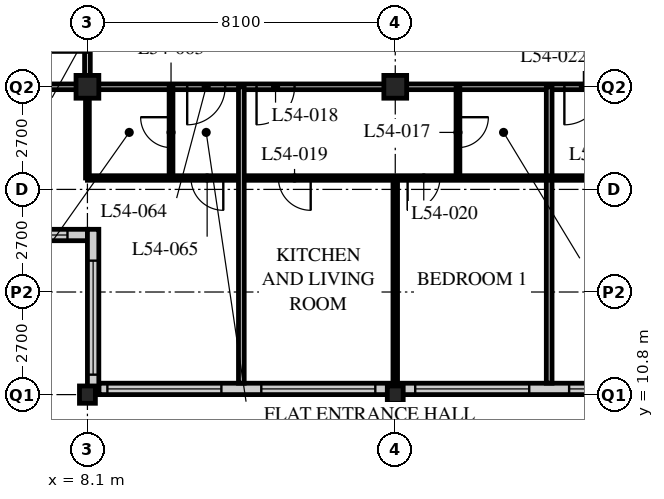
"""IFC4 building model, lengths in metres.
Left out: names, types, materials, properties, quantities, classifications, styles, units other than length and angle.
Written with IfcOpenShell. Run it as: python <this file> out.ifc"""

import sys

from ifc_helpers import new_model, si_unit, direction, frame, frame_2d, origin, origin_2d, place, context, subcontext, project, spatial, rectangle, hollow_rectangle, i_section, extrude, element, fill, save


model = new_model("IFC4")
c1 = context("Model", 3, precision=1e-05, world=origin(), true_north=direction((0.0, 1.0)))
c2 = subcontext(c1, "Body", "Model", "MODEL_VIEW")
j1 = project(units=[si_unit("LENGTHUNIT", "METRE"), si_unit("PLANEANGLEUNIT", "RADIAN")], contexts=[c1])
p1 = place(None, origin())
s1 = spatial("IfcSite", under=j1, at=p1, CompositionType="ELEMENT")
p2 = place(p1, origin())
s2 = spatial("IfcBuilding", under=s1, at=p2, CompositionType="ELEMENT")
p3 = place(p2, frame((0.0, 0.0, 210.0)))
s3 = spatial("IfcBuildingStorey", under=s2, at=p3, CompositionType="ELEMENT", Elevation=210.0)
p4 = place(p3, frame((8.1, 10.8, 0.0), z_axis=(0.0, 0.0, 1.0), x_axis=(1.0, 0.0, 0.0)))
e1 = element("IfcColumn", 1, at=p4, inside=s3, PredefinedType="COLUMN", context=c2, shape_type="SweptSolid", body=[
    extrude(i_section(OverallWidth=0.418, OverallDepth=0.456, WebThickness=0.042, FlangeThickness=0.067, FilletRadius=0.015, at=origin_2d()), origin(), (0.0, 0.0, 1.0), 3.6),
])
p5 = place(p3, frame((8.1, 18.9, 0.0), z_axis=(0.0, 0.0, 1.0), x_axis=(1.0, 0.0, 0.0)))
e2 = element("IfcColumn", 2, at=p5, inside=s3, PredefinedType="COLUMN", context=c2, shape_type="SweptSolid", body=[
    extrude(hollow_rectangle(XDim=0.6, YDim=0.6, WallThickness=0.05, at=origin_2d()), origin(), (0.0, 0.0, 1.0), 3.6),
])
p6 = place(p3, frame((16.2, 10.8, 0.0), z_axis=(0.0, 0.0, 1.0), x_axis=(1.0, 0.0, 0.0)))
e3 = element("IfcColumn", 3, at=p6, inside=s3, PredefinedType="COLUMN", context=c2, shape_type="SweptSolid", body=[
    extrude(i_section(OverallWidth=0.418, OverallDepth=0.456, WebThickness=0.042, FlangeThickness=0.067, FilletRadius=0.015, at=origin_2d()), origin(), (0.0, 0.0, 1.0), 3.6),
])
p7 = place(p3, frame((16.2, 18.9, 0.0), z_axis=(0.0, 0.0, 1.0), x_axis=(1.0, 0.0, 0.0)))
e4 = element("IfcColumn", 4, at=p7, inside=s3, PredefinedType="COLUMN", context=c2, shape_type="SweptSolid", body=[
    extrude(hollow_rectangle(XDim=0.6, YDim=0.6, WallThickness=0.05, at=origin_2d()), origin(), (0.0, 0.0, 1.0), 3.6),
])
p8 = place(p3, frame((8.4, 10.95, 0.0), z_axis=(0.0, 0.0, 1.0), x_axis=(1.0, 0.0, 0.0)))
e5 = element("IfcWall", 5, at=p8, inside=s3, PredefinedType="SOLIDWALL", context=c2, shape_type="SweptSolid", body=[
    extrude(rectangle(XDim=40.2, YDim=0.3, at=frame_2d((20.1, 0.0))), origin(), (0.0, 0.0, 1.0), 3.39),
])
p9 = place(p8, frame((0.225, 0.0, 0.6)))
e6 = element("IfcOpeningElement", 6, at=p9, cuts=e5, PredefinedType="OPENING", context=c2, shape_type="SweptSolid", body=[
    extrude(rectangle(XDim=3.0, YDim=2.4, at=frame_2d((1.5, 1.2))), frame((0.0, 0.16, 0.0), z_axis=(0.0, -1.0, 0.0), x_axis=(1.0, 0.0, 0.0)), (0.0, 0.0, 1.0), 0.32),
])
p10 = place(p8, frame((4.275, 0.0, 0.6)))
e7 = element("IfcOpeningElement", 7, at=p10, cuts=e5, PredefinedType="OPENING", context=c2, shape_type="SweptSolid", body=[
    extrude(rectangle(XDim=3.0, YDim=2.4, at=frame_2d((1.5, 1.2))), frame((0.0, 0.16, 0.0), z_axis=(0.0, -1.0, 0.0), x_axis=(1.0, 0.0, 0.0)), (0.0, 0.0, 1.0), 0.32),
])
p11 = place(p8, frame((8.325, 0.0, 0.6)))
e8 = element("IfcOpeningElement", 8, at=p11, cuts=e5, PredefinedType="OPENING", context=c2, shape_type="SweptSolid", body=[
    extrude(rectangle(XDim=3.0, YDim=2.4, at=frame_2d((1.5, 1.2))), frame((0.0, 0.16, 0.0), z_axis=(0.0, -1.0, 0.0), x_axis=(1.0, 0.0, 0.0)), (0.0, 0.0, 1.0), 0.32),
])
p12 = place(p8, frame((12.375, 0.0, 0.6)))
e9 = element("IfcOpeningElement", 9, at=p12, cuts=e5, PredefinedType="OPENING", context=c2, shape_type="SweptSolid", body=[
    extrude(rectangle(XDim=3.0, YDim=2.4, at=frame_2d((1.5, 1.2))), frame((0.0, 0.16, 0.0), z_axis=(0.0, -1.0, 0.0), x_axis=(1.0, 0.0, 0.0)), (0.0, 0.0, 1.0), 0.32),
])
p13 = place(p8, frame((16.425, 0.0, 0.6)))
e10 = element("IfcOpeningElement", 10, at=p13, cuts=e5, PredefinedType="OPENING", context=c2, shape_type="SweptSolid", body=[
    extrude(rectangle(XDim=3.0, YDim=2.4, at=frame_2d((1.5, 1.2))), frame((0.0, 0.16, 0.0), z_axis=(0.0, -1.0, 0.0), x_axis=(1.0, 0.0, 0.0)), (0.0, 0.0, 1.0), 0.32),
])
p14 = place(p8, frame((20.475, 0.0, 0.6)))
e11 = element("IfcOpeningElement", 11, at=p14, cuts=e5, PredefinedType="OPENING", context=c2, shape_type="SweptSolid", body=[
    extrude(rectangle(XDim=3.0, YDim=2.4, at=frame_2d((1.5, 1.2))), frame((0.0, 0.16, 0.0), z_axis=(0.0, -1.0, 0.0), x_axis=(1.0, 0.0, 0.0)), (0.0, 0.0, 1.0), 0.32),
])
p15 = place(p8, frame((24.525, 0.0, 0.6)))
e12 = element("IfcOpeningElement", 12, at=p15, cuts=e5, PredefinedType="OPENING", context=c2, shape_type="SweptSolid", body=[
    extrude(rectangle(XDim=3.0, YDim=2.4, at=frame_2d((1.5, 1.2))), frame((0.0, 0.16, 0.0), z_axis=(0.0, -1.0, 0.0), x_axis=(1.0, 0.0, 0.0)), (0.0, 0.0, 1.0), 0.32),
])
p16 = place(p8, frame((28.575, 0.0, 0.6)))
e13 = element("IfcOpeningElement", 13, at=p16, cuts=e5, PredefinedType="OPENING", context=c2, shape_type="SweptSolid", body=[
    extrude(rectangle(XDim=3.0, YDim=2.4, at=frame_2d((1.5, 1.2))), frame((0.0, 0.16, 0.0), z_axis=(0.0, -1.0, 0.0), x_axis=(1.0, 0.0, 0.0)), (0.0, 0.0, 1.0), 0.32),
])
p17 = place(p8, frame((32.625, 0.0, 0.6)))
e14 = element("IfcOpeningElement", 14, at=p17, cuts=e5, PredefinedType="OPENING", context=c2, shape_type="SweptSolid", body=[
    extrude(rectangle(XDim=3.0, YDim=2.4, at=frame_2d((1.5, 1.2))), frame((0.0, 0.16, 0.0), z_axis=(0.0, -1.0, 0.0), x_axis=(1.0, 0.0, 0.0)), (0.0, 0.0, 1.0), 0.32),
])
p18 = place(p8, frame((36.675, 0.0, 0.6)))
e15 = element("IfcOpeningElement", 15, at=p18, cuts=e5, PredefinedType="OPENING", context=c2, shape_type="SweptSolid", body=[
    extrude(rectangle(XDim=3.0, YDim=2.4, at=frame_2d((1.5, 1.2))), frame((0.0, 0.16, 0.0), z_axis=(0.0, -1.0, 0.0), x_axis=(1.0, 0.0, 0.0)), (0.0, 0.0, 1.0), 0.32),
])
p19 = place(p3, frame((4.35, 15.0, 0.0), z_axis=(0.0, 0.0, 1.0), x_axis=(1.0, 0.0, 0.0)))
e16 = element("IfcWall", 16, at=p19, inside=s3, PredefinedType="SOLIDWALL", context=c2, shape_type="SweptSolid", body=[
    extrude(rectangle(XDim=3.75, YDim=0.3, at=frame_2d((1.875, 0.0))), origin(), (0.0, 0.0, 1.0), 3.39),
])
p20 = place(p19, frame((0.225, 0.0, 0.6)))
e17 = element("IfcOpeningElement", 17, at=p20, cuts=e16, PredefinedType="OPENING", context=c2, shape_type="SweptSolid", body=[
    extrude(rectangle(XDim=3.0, YDim=2.0, at=frame_2d((1.5, 1.0))), frame((0.0, 0.16, 0.0), z_axis=(0.0, -1.0, 0.0), x_axis=(1.0, 0.0, 0.0)), (0.0, 0.0, 1.0), 0.32),
])
p21 = place(p3, frame((8.25, 15.15, 0.0), z_axis=(0.0, 0.0, 1.0), x_axis=(0.0, -1.0, 0.0)))
e18 = element("IfcWall", 18, at=p21, inside=s3, PredefinedType="SOLIDWALL", context=c2, shape_type="SweptSolid", body=[
    extrude(rectangle(XDim=4.35, YDim=0.3, at=frame_2d((2.175, 0.0))), origin(), (0.0, 0.0, 1.0), 3.39),
])
p22 = place(p21, frame((0.825, 0.0, 0.6)))
e19 = element("IfcOpeningElement", 19, at=p22, cuts=e18, PredefinedType="OPENING", context=c2, shape_type="SweptSolid", body=[
    extrude(rectangle(XDim=3.0, YDim=2.0, at=frame_2d((1.5, 1.0))), frame((0.0, 0.16, 0.0), z_axis=(0.0, -1.0, 0.0), x_axis=(1.0, 0.0, 0.0)), (0.0, 0.0, 1.0), 0.32),
])
p23 = place(p3, frame((8.1, 18.9, 0.0), z_axis=(0.0, 0.0, 1.0), x_axis=(1.0, 0.0, 0.0)))
e20 = element("IfcWall", 20, at=p23, inside=s3, PredefinedType="PARTITIONING", context=c2, shape_type="SweptSolid", body=[
    extrude(rectangle(XDim=36.45, YDim=0.15, at=frame_2d((18.225, 0.0))), origin(), (0.0, 0.0, 1.0), 2.778),
])
p24 = place(p23, frame((4.45, 0.0, 0.0)))
e21 = element("IfcOpeningElement", 21, at=p24, cuts=e20, PredefinedType="OPENING", context=c2, shape_type="SweptSolid", body=[
    extrude(rectangle(XDim=1.0, YDim=2.1, at=frame_2d((0.5, 1.05))), frame((0.0, 0.085, 0.0), z_axis=(0.0, -1.0, 0.0), x_axis=(1.0, 0.0, 0.0)), (0.0, 0.0, 1.0), 0.17),
])
p25 = place(p23, frame((12.55, 0.0, 0.0)))
e22 = element("IfcOpeningElement", 22, at=p25, cuts=e20, PredefinedType="OPENING", context=c2, shape_type="SweptSolid", body=[
    extrude(rectangle(XDim=1.0, YDim=2.1, at=frame_2d((0.5, 1.05))), frame((0.0, 0.085, 0.0), z_axis=(0.0, -1.0, 0.0), x_axis=(1.0, 0.0, 0.0)), (0.0, 0.0, 1.0), 0.17),
])
p26 = place(p23, frame((29.05, 0.0, 0.0)))
e23 = element("IfcOpeningElement", 23, at=p26, cuts=e20, PredefinedType="OPENING", context=c2, shape_type="SweptSolid", body=[
    extrude(rectangle(XDim=1.0, YDim=2.1, at=frame_2d((0.5, 1.05))), frame((0.0, 0.085, 0.0), z_axis=(0.0, -1.0, 0.0), x_axis=(1.0, 0.0, 0.0)), (0.0, 0.0, 1.0), 0.17),
])
p27 = place(p23, frame((2.625, 0.0, 0.0)))
e24 = element("IfcOpeningElement", 24, at=p27, cuts=e20, PredefinedType="OPENING", context=c2, shape_type="SweptSolid", body=[
    extrude(rectangle(XDim=1.0, YDim=2.1, at=frame_2d((0.5, 1.05))), frame((0.0, 0.085, 0.0), z_axis=(0.0, -1.0, 0.0), x_axis=(1.0, 0.0, 0.0)), (0.0, 0.0, 1.0), 0.17),
])
p28 = place(p23, frame((33.925, 0.0, 0.0)))
e25 = element("IfcOpeningElement", 25, at=p28, cuts=e20, PredefinedType="OPENING", context=c2, shape_type="SweptSolid", body=[
    extrude(rectangle(XDim=1.0, YDim=2.1, at=frame_2d((0.5, 1.05))), frame((0.0, 0.085, 0.0), z_axis=(0.0, -1.0, 0.0), x_axis=(1.0, 0.0, 0.0)), (0.0, 0.0, 1.0), 0.17),
])
p29 = place(p3, frame((8.1, 18.9, 0.0), z_axis=(0.0, 0.0, 1.0), x_axis=(0.0, 1.0, 0.0)))
e26 = element("IfcWall", 26, at=p29, inside=s3, PredefinedType="PARTITIONING", context=c2, shape_type="SweptSolid", body=[
    extrude(rectangle(XDim=28.35, YDim=0.15, at=frame_2d((14.175, 0.0))), origin(), (0.0, 0.0, 1.0), 2.778),
])
p30 = place(p29, frame((0.9, 0.0, 0.0)))
e27 = element("IfcOpeningElement", 27, at=p30, cuts=e26, PredefinedType="OPENING", context=c2, shape_type="SweptSolid", body=[
    extrude(rectangle(XDim=1.0, YDim=2.1, at=frame_2d((0.5, 1.05))), frame((0.0, 0.085, 0.0), z_axis=(0.0, -1.0, 0.0), x_axis=(1.0, 0.0, 0.0)), (0.0, 0.0, 1.0), 0.17),
])
p31 = place(p29, frame((17.1, 0.0, 0.0)))
e28 = element("IfcOpeningElement", 28, at=p31, cuts=e26, PredefinedType="OPENING", context=c2, shape_type="SweptSolid", body=[
    extrude(rectangle(XDim=1.0, YDim=2.1, at=frame_2d((0.5, 1.05))), frame((0.0, 0.085, 0.0), z_axis=(0.0, -1.0, 0.0), x_axis=(1.0, 0.0, 0.0)), (0.0, 0.0, 1.0), 0.17),
])
p32 = place(p29, frame((26.65, 0.0, 0.0)))
e29 = element("IfcOpeningElement", 29, at=p32, cuts=e26, PredefinedType="OPENING", context=c2, shape_type="SweptSolid", body=[
    extrude(rectangle(XDim=1.0, YDim=2.1, at=frame_2d((0.5, 1.05))), frame((0.0, 0.085, 0.0), z_axis=(0.0, -1.0, 0.0), x_axis=(1.0, 0.0, 0.0)), (0.0, 0.0, 1.0), 0.17),
])
p33 = place(p3, frame((17.85, 18.9, 0.0), z_axis=(0.0, 0.0, 1.0), x_axis=(0.0, -1.0, 0.0)))
e30 = element("IfcWall", 30, at=p33, inside=s3, PredefinedType="PARTITIONING", context=c2, shape_type="SweptSolid", body=[
    extrude(rectangle(XDim=2.4, YDim=0.1, at=frame_2d((1.2, 0.0))), origin(), (0.0, 0.0, 1.0), 3.39),
])
p34 = place(p33, frame((0.8, 0.0, 0.0)))
e31 = element("IfcOpeningElement", 31, at=p34, cuts=e30, PredefinedType="OPENING", context=c2, shape_type="SweptSolid", body=[
    extrude(rectangle(XDim=0.8, YDim=2.1, at=frame_2d((0.4, 1.05))), frame((0.0, 0.06, 0.0), z_axis=(0.0, -1.0, 0.0), x_axis=(1.0, 0.0, 0.0)), (0.0, 0.0, 1.0), 0.12),
])
p35 = place(p3, frame((16.2, 16.5, 0.0), z_axis=(0.0, 0.0, 1.0), x_axis=(0.0, -1.0, 0.0)))
e32 = element("IfcWall", 32, at=p35, inside=s3, PredefinedType="PARTITIONING", context=c2, shape_type="SweptSolid", body=[
    extrude(rectangle(XDim=5.4, YDim=0.12, at=frame_2d((2.7, 0.0))), origin(), (0.0, 0.0, 1.0), 2.778),
])
p36 = place(p3, frame((20.25, 18.9, 0.0), z_axis=(0.0, 0.0, 1.0), x_axis=(0.0, -1.0, 0.0)))
e33 = element("IfcWall", 33, at=p36, inside=s3, PredefinedType="PARTITIONING", context=c2, shape_type="SweptSolid", body=[
    extrude(rectangle(XDim=7.8, YDim=0.15, at=frame_2d((3.9, 0.0))), origin(), (0.0, 0.0, 1.0), 3.39),
])
p37 = place(p3, frame((8.1, 16.5, 0.0), z_axis=(0.0, 0.0, 1.0), x_axis=(1.0, 0.0, 0.0)))
e34 = element("IfcWall", 34, at=p37, inside=s3, PredefinedType="PARTITIONING", context=c2, shape_type="SweptSolid", body=[
    extrude(rectangle(XDim=28.35, YDim=0.12, at=frame_2d((14.175, 0.0))), origin(), (0.0, 0.0, 1.0), 3.39),
])
p38 = place(p37, frame((5.025, 0.0, 0.0)))
e35 = element("IfcOpeningElement", 35, at=p38, cuts=e34, PredefinedType="OPENING", context=c2, shape_type="SweptSolid", body=[
    extrude(rectangle(XDim=0.85, YDim=2.1, at=frame_2d((0.425, 1.05))), frame((0.0, 0.07, 0.0), z_axis=(0.0, -1.0, 0.0), x_axis=(1.0, 0.0, 0.0)), (0.0, 0.0, 1.0), 0.14),
])
p39 = place(p37, frame((8.425, 0.0, 0.0)))
e36 = element("IfcOpeningElement", 36, at=p39, cuts=e34, PredefinedType="OPENING", context=c2, shape_type="SweptSolid", body=[
    extrude(rectangle(XDim=0.85, YDim=2.1, at=frame_2d((0.425, 1.05))), frame((0.0, 0.07, 0.0), z_axis=(0.0, -1.0, 0.0), x_axis=(1.0, 0.0, 0.0)), (0.0, 0.0, 1.0), 0.14),
])
p40 = place(p37, frame((13.125, 0.0, 0.0)))
e37 = element("IfcOpeningElement", 37, at=p40, cuts=e34, PredefinedType="OPENING", context=c2, shape_type="SweptSolid", body=[
    extrude(rectangle(XDim=0.85, YDim=2.1, at=frame_2d((0.425, 1.05))), frame((0.0, 0.07, 0.0), z_axis=(0.0, -1.0, 0.0), x_axis=(1.0, 0.0, 0.0)), (0.0, 0.0, 1.0), 0.14),
])
p41 = place(p37, frame((20.575, 0.0, 0.0)))
e38 = element("IfcOpeningElement", 38, at=p41, cuts=e34, PredefinedType="OPENING", context=c2, shape_type="SweptSolid", body=[
    extrude(rectangle(XDim=0.85, YDim=2.1, at=frame_2d((0.425, 1.05))), frame((0.0, 0.07, 0.0), z_axis=(0.0, -1.0, 0.0), x_axis=(1.0, 0.0, 0.0)), (0.0, 0.0, 1.0), 0.14),
])
p42 = place(p37, frame((24.625, 0.0, 0.0)))
e39 = element("IfcOpeningElement", 39, at=p42, cuts=e34, PredefinedType="OPENING", context=c2, shape_type="SweptSolid", body=[
    extrude(rectangle(XDim=0.85, YDim=2.1, at=frame_2d((0.425, 1.05))), frame((0.0, 0.07, 0.0), z_axis=(0.0, -1.0, 0.0), x_axis=(1.0, 0.0, 0.0)), (0.0, 0.0, 1.0), 0.14),
])
p43 = place(p37, frame((2.725, 0.0, 0.0)))
e40 = element("IfcOpeningElement", 40, at=p43, cuts=e34, PredefinedType="OPENING", context=c2, shape_type="SweptSolid", body=[
    extrude(rectangle(XDim=0.85, YDim=2.1, at=frame_2d((0.425, 1.05))), frame((0.0, 0.07, 0.0), z_axis=(0.0, -1.0, 0.0), x_axis=(1.0, 0.0, 0.0)), (0.0, 0.0, 1.0), 0.14),
])
p44 = place(p3, frame((10.3, 18.9, 0.0), z_axis=(0.0, 0.0, 1.0), x_axis=(0.0, -1.0, 0.0)))
e41 = element("IfcWall", 41, at=p44, inside=s3, PredefinedType="PARTITIONING", context=c2, shape_type="SweptSolid", body=[
    extrude(rectangle(XDim=2.4, YDim=0.1, at=frame_2d((1.2, 0.0))), origin(), (0.0, 0.0, 1.0), 3.39),
])
p45 = place(p44, frame((0.8, 0.0, 0.0)))
e42 = element("IfcOpeningElement", 42, at=p45, cuts=e41, PredefinedType="OPENING", context=c2, shape_type="SweptSolid", body=[
    extrude(rectangle(XDim=0.8, YDim=2.1, at=frame_2d((0.4, 1.05))), frame((0.0, 0.06, 0.0), z_axis=(0.0, -1.0, 0.0), x_axis=(1.0, 0.0, 0.0)), (0.0, 0.0, 1.0), 0.12),
])
p46 = place(p3, frame((8.1, 18.9, 0.0), z_axis=(0.0, 0.0, 1.0), x_axis=(0.0, -1.0, 0.0)))
e43 = element("IfcWall", 43, at=p46, inside=s3, PredefinedType="PARTITIONING", context=c2, shape_type="SweptSolid", body=[
    extrude(rectangle(XDim=2.4, YDim=0.1, at=frame_2d((1.2, 0.0))), origin(), (0.0, 0.0, 1.0), 2.778),
])
p47 = place(p3, frame((4.35, 18.9, 0.0), z_axis=(0.0, 0.0, 1.0), x_axis=(1.0, 0.0, 0.0)))
e44 = element("IfcWall", 44, at=p47, inside=s3, PredefinedType="PARTITIONING", context=c2, shape_type="SweptSolid", body=[
    extrude(rectangle(XDim=3.75, YDim=0.15, at=frame_2d((1.875, 0.0))), origin(), (0.0, 0.0, 1.0), 2.778),
])
p48 = place(p3, frame((12.15, 18.9, 0.0), z_axis=(0.0, 0.0, 1.0), x_axis=(0.0, -1.0, 0.0)))
e45 = element("IfcWall", 45, at=p48, inside=s3, PredefinedType="PARTITIONING", context=c2, shape_type="SweptSolid", body=[
    extrude(rectangle(XDim=7.8, YDim=0.15, at=frame_2d((3.9, 0.0))), origin(), (0.0, 0.0, 1.0), 3.39),
])
p49 = place(p9, origin())
e46 = element("IfcWindow", 46, at=p49, inside=s3, PartitioningType="SINGLE_PANEL", PredefinedType="WINDOW", context=c2, shape_type="SweptSolid", body=[
    extrude(rectangle(XDim=3.0, YDim=2.4, at=frame_2d((1.5, 1.2))), frame((0.0, 0.03, 0.0), z_axis=(0.0, -1.0, 0.0), x_axis=(1.0, 0.0, 0.0)), (0.0, 0.0, 1.0), 0.06),
])
fill(e6, e46)
p50 = place(p10, origin())
e47 = element("IfcWindow", 47, at=p50, inside=s3, PartitioningType="SINGLE_PANEL", PredefinedType="WINDOW", context=c2, shape_type="SweptSolid", body=[
    extrude(rectangle(XDim=3.0, YDim=2.4, at=frame_2d((1.5, 1.2))), frame((0.0, 0.03, 0.0), z_axis=(0.0, -1.0, 0.0), x_axis=(1.0, 0.0, 0.0)), (0.0, 0.0, 1.0), 0.06),
])
fill(e7, e47)
p51 = place(p11, origin())
e48 = element("IfcWindow", 48, at=p51, inside=s3, PartitioningType="SINGLE_PANEL", PredefinedType="WINDOW", context=c2, shape_type="SweptSolid", body=[
    extrude(rectangle(XDim=3.0, YDim=2.4, at=frame_2d((1.5, 1.2))), frame((0.0, 0.03, 0.0), z_axis=(0.0, -1.0, 0.0), x_axis=(1.0, 0.0, 0.0)), (0.0, 0.0, 1.0), 0.06),
])
fill(e8, e48)
p52 = place(p12, origin())
e49 = element("IfcWindow", 49, at=p52, inside=s3, PartitioningType="SINGLE_PANEL", PredefinedType="WINDOW", context=c2, shape_type="SweptSolid", body=[
    extrude(rectangle(XDim=3.0, YDim=2.4, at=frame_2d((1.5, 1.2))), frame((0.0, 0.03, 0.0), z_axis=(0.0, -1.0, 0.0), x_axis=(1.0, 0.0, 0.0)), (0.0, 0.0, 1.0), 0.06),
])
fill(e9, e49)
p53 = place(p20, origin())
e50 = element("IfcWindow", 50, at=p53, inside=s3, PartitioningType="SINGLE_PANEL", PredefinedType="WINDOW", context=c2, shape_type="SweptSolid", body=[
    extrude(rectangle(XDim=3.0, YDim=2.0, at=frame_2d((1.5, 1.0))), frame((0.0, 0.03, 0.0), z_axis=(0.0, -1.0, 0.0), x_axis=(1.0, 0.0, 0.0)), (0.0, 0.0, 1.0), 0.06),
])
fill(e17, e50)
p54 = place(p22, origin())
e51 = element("IfcWindow", 51, at=p54, inside=s3, PartitioningType="SINGLE_PANEL", PredefinedType="WINDOW", context=c2, shape_type="SweptSolid", body=[
    extrude(rectangle(XDim=3.0, YDim=2.0, at=frame_2d((1.5, 1.0))), frame((0.0, 0.03, 0.0), z_axis=(0.0, -1.0, 0.0), x_axis=(1.0, 0.0, 0.0)), (0.0, 0.0, 1.0), 0.06),
])
fill(e19, e51)
p55 = place(p34, origin())
e52 = element("IfcDoor", 52, at=p55, inside=s3, OperationType="SINGLE_SWING_LEFT", PredefinedType="DOOR", context=c2, shape_type="SweptSolid", body=[
    extrude(rectangle(XDim=0.8, YDim=2.1, at=frame_2d((0.4, 1.05))), frame((0.0, 0.025, 0.0), z_axis=(0.0, -1.0, 0.0), x_axis=(1.0, 0.0, 0.0)), (0.0, 0.0, 1.0), 0.05),
])
fill(e31, e52)
p56 = place(p24, origin())
e53 = element("IfcDoor", 53, at=p56, inside=s3, OperationType="SINGLE_SWING_RIGHT", PredefinedType="DOOR", context=c2, shape_type="SweptSolid", body=[
    extrude(rectangle(XDim=1.0, YDim=2.1, at=frame_2d((0.5, 1.05))), frame((0.0, 0.025, 0.0), z_axis=(0.0, -1.0, 0.0), x_axis=(1.0, 0.0, 0.0)), (0.0, 0.0, 1.0), 0.05),
])
fill(e21, e53)
p57 = place(p38, origin())
e54 = element("IfcDoor", 54, at=p57, inside=s3, OperationType="SINGLE_SWING_LEFT", PredefinedType="DOOR", context=c2, shape_type="SweptSolid", body=[
    extrude(rectangle(XDim=0.85, YDim=2.1, at=frame_2d((0.425, 1.05))), frame((0.0, 0.025, 0.0), z_axis=(0.0, -1.0, 0.0), x_axis=(1.0, 0.0, 0.0)), (0.0, 0.0, 1.0), 0.05),
])
fill(e35, e54)
p58 = place(p39, origin())
e55 = element("IfcDoor", 55, at=p58, inside=s3, OperationType="SINGLE_SWING_RIGHT", PredefinedType="DOOR", context=c2, shape_type="SweptSolid", body=[
    extrude(rectangle(XDim=0.85, YDim=2.1, at=frame_2d((0.425, 1.05))), frame((0.0, 0.025, 0.0), z_axis=(0.0, -1.0, 0.0), x_axis=(1.0, 0.0, 0.0)), (0.0, 0.0, 1.0), 0.05),
])
fill(e36, e55)
p59 = place(p25, origin())
e56 = element("IfcDoor", 56, at=p59, inside=s3, OperationType="SINGLE_SWING_RIGHT", PredefinedType="DOOR", context=c2, shape_type="SweptSolid", body=[
    extrude(rectangle(XDim=1.0, YDim=2.1, at=frame_2d((0.5, 1.05))), frame((0.0, 0.025, 0.0), z_axis=(0.0, -1.0, 0.0), x_axis=(1.0, 0.0, 0.0)), (0.0, 0.0, 1.0), 0.05),
])
fill(e22, e56)
p60 = place(p30, origin())
e57 = element("IfcDoor", 57, at=p60, inside=s3, OperationType="SINGLE_SWING_LEFT", PredefinedType="DOOR", context=c2, shape_type="SweptSolid", body=[
    extrude(rectangle(XDim=1.0, YDim=2.1, at=frame_2d((0.5, 1.05))), frame((0.0, 0.025, 0.0), z_axis=(0.0, -1.0, 0.0), x_axis=(1.0, 0.0, 0.0)), (0.0, 0.0, 1.0), 0.05),
])
fill(e27, e57)
p61 = place(p45, origin())
e58 = element("IfcDoor", 58, at=p61, inside=s3, OperationType="SINGLE_SWING_RIGHT", PredefinedType="DOOR", context=c2, shape_type="SweptSolid", body=[
    extrude(rectangle(XDim=0.8, YDim=2.1, at=frame_2d((0.4, 1.05))), frame((0.0, 0.025, 0.0), z_axis=(0.0, -1.0, 0.0), x_axis=(1.0, 0.0, 0.0)), (0.0, 0.0, 1.0), 0.05),
])
fill(e42, e58)
p62 = place(p27, origin())
e59 = element("IfcDoor", 59, at=p62, inside=s3, OperationType="SINGLE_SWING_RIGHT", PredefinedType="DOOR", context=c2, shape_type="SweptSolid", body=[
    extrude(rectangle(XDim=1.0, YDim=2.1, at=frame_2d((0.5, 1.05))), frame((0.0, 0.025, 0.0), z_axis=(0.0, -1.0, 0.0), x_axis=(1.0, 0.0, 0.0)), (0.0, 0.0, 1.0), 0.05),
])
fill(e24, e59)
p63 = place(p43, origin())
e60 = element("IfcDoor", 60, at=p63, inside=s3, OperationType="SINGLE_SWING_LEFT", PredefinedType="DOOR", context=c2, shape_type="SweptSolid", body=[
    extrude(rectangle(XDim=0.85, YDim=2.1, at=frame_2d((0.425, 1.05))), frame((0.0, 0.025, 0.0), z_axis=(0.0, -1.0, 0.0), x_axis=(1.0, 0.0, 0.0)), (0.0, 0.0, 1.0), 0.05),
])
fill(e40, e60)
save(model, sys.argv[1])
